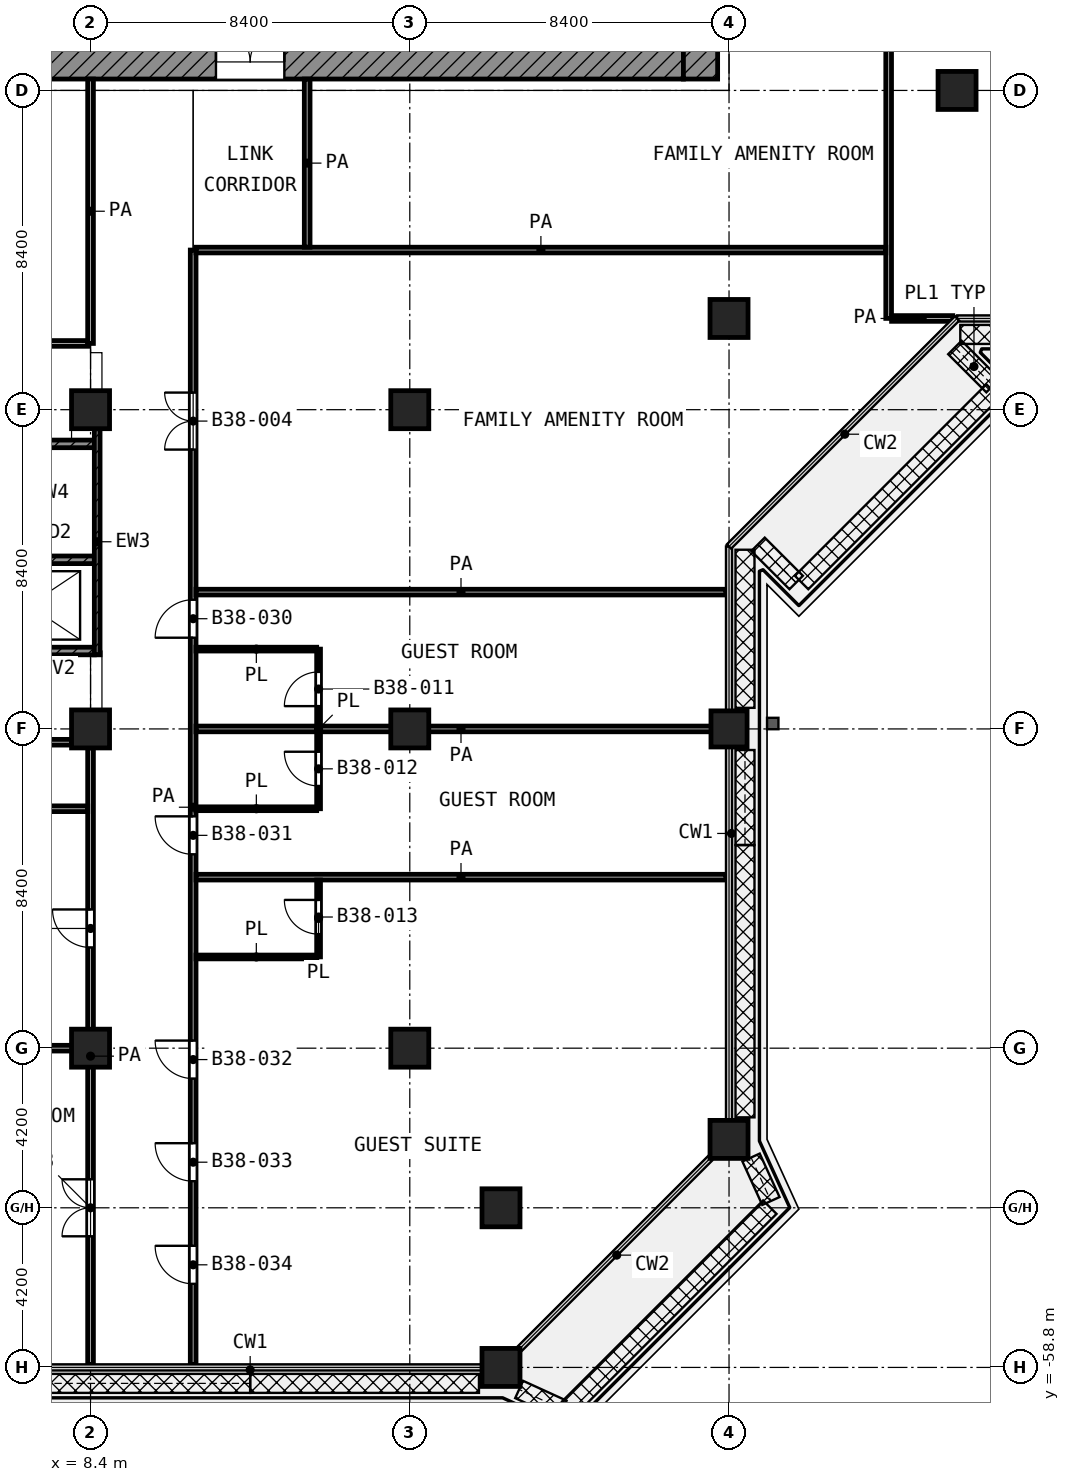
"""IFC4 building model, lengths in metres.
Left out: names, types, materials, properties, quantities, classifications, styles, units other than length and angle.
Written with IfcOpenShell. Run it as: python <this file> out.ifc"""

import sys

from ifc_helpers import new_model, si_unit, direction, frame, frame_2d, origin, origin_2d, place, context, subcontext, project, spatial, rectangle, extrude, element, fill, save


model = new_model("IFC4")
c1 = context("Model", 3, precision=1e-05, world=origin(), true_north=direction((0.0, 1.0)))
c2 = subcontext(c1, "Body", "Model", "MODEL_VIEW")
j1 = project(units=[si_unit("LENGTHUNIT", "METRE"), si_unit("PLANEANGLEUNIT", "RADIAN")], contexts=[c1])
p1 = place(None, origin())
s1 = spatial("IfcSite", under=j1, at=p1, CompositionType="ELEMENT")
p2 = place(p1, origin())
s2 = spatial("IfcBuilding", under=s1, at=p2, CompositionType="ELEMENT")
p3 = place(p2, frame((0.0, 0.0, 166.8)))
s3 = spatial("IfcBuildingStorey", under=s2, at=p3, CompositionType="ELEMENT", Elevation=166.8)
for number, where, z_axis, x_axis in (
    (1, (31.2, -25.2, 0.0), (0.0, 0.0, 1.0), (1.0, 0.0, 0.0)),
    (2, (25.2, -31.2, 0.0), (0.0, 0.0, 1.0), (1.0, 0.0, 0.0)),
    (3, (8.4, -33.6, 0.0), (0.0, 0.0, 1.0), (1.0, 0.0, 0.0)),
    (4, (16.8, -33.6, 0.0), (0.0, 0.0, 1.0), (1.0, 0.0, 0.0)),
    (5, (8.4, -42.0, 0.0), (0.0, 0.0, 1.0), (1.0, 0.0, 0.0)),
    (6, (16.8, -42.0, 0.0), (0.0, 0.0, 1.0), (1.0, 0.0, 0.0)),
):
    element("IfcColumn", number, at=place(p3, frame(where, z_axis=z_axis, x_axis=x_axis)), inside=s3, PredefinedType="COLUMN", context=c2, shape_type="SweptSolid", body=[
        extrude(rectangle(XDim=1.0, YDim=1.0, at=origin_2d()), origin(), (0.0, 0.0, 1.0), 4.2),
    ])
p4 = place(p3, frame((25.2, -42.0, 0.0), z_axis=(0.0, 0.0, 1.0), x_axis=(1.0, 0.0, 0.0)))
e7 = element("IfcColumn", 7, at=p4, inside=s3, PredefinedType="COLUMN", context=c2, shape_type="SweptSolid", body=[
    extrude(rectangle(XDim=0.95, YDim=0.95, at=origin_2d()), origin(), (0.0, 0.0, 1.0), 4.2),
])
for number, where, z_axis, x_axis in (
    (8, (8.4, -50.4, 0.0), (0.0, 0.0, 1.0), (1.0, 0.0, 0.0)),
    (9, (16.8, -50.4, 0.0), (0.0, 0.0, 1.0), (1.0, 0.0, 0.0)),
    (10, (25.2, -52.8, 0.0), (0.0, 0.0, 1.0), (1.0, 0.0, 0.0)),
    (11, (19.2, -54.6, 0.0), (0.0, 0.0, 1.0), (1.0, 0.0, 0.0)),
    (12, (19.2, -58.8, 0.0), (0.0, 0.0, 1.0), (1.0, 0.0, 0.0)),
):
    element("IfcColumn", number, at=place(p3, frame(where, z_axis=z_axis, x_axis=x_axis)), inside=s3, PredefinedType="COLUMN", context=c2, shape_type="SweptSolid", body=[
        extrude(rectangle(XDim=1.0, YDim=1.0, at=origin_2d()), origin(), (0.0, 0.0, 1.0), 4.2),
    ])
p5 = place(p3, frame((5.4, -24.45, 0.0), z_axis=(0.0, 0.0, 1.0), x_axis=(1.0, 0.0, 0.0)))
e13 = element("IfcWall", 13, at=p5, inside=s3, PredefinedType="SHEAR", context=c2, shape_type="SweptSolid", body=[
    extrude(rectangle(XDim=18.6, YDim=0.9, at=frame_2d((9.3, 0.0))), origin(), (0.0, 0.0, 1.0), 3.6),
])
p6 = place(p5, frame((6.3, 0.0, 0.0)))
e14 = element("IfcOpeningElement", 14, at=p6, cuts=e13, PredefinedType="OPENING", context=c2, shape_type="SweptSolid", body=[
    extrude(rectangle(XDim=1.8, YDim=2.1, at=frame_2d((0.9, 1.05))), frame((0.0, 0.46, 0.0), z_axis=(0.0, -1.0, 0.0), x_axis=(1.0, 0.0, 0.0)), (0.0, 0.0, 1.0), 0.92),
])
p7 = place(p3, frame((24.45, -24.9, 0.0), z_axis=(0.0, 0.0, 1.0), x_axis=(0.0, 1.0, 0.0)))
e15 = element("IfcWall", 15, at=p7, inside=s3, PredefinedType="SHEAR", context=c2, shape_type="SweptSolid", body=[
    extrude(rectangle(XDim=0.9, YDim=0.9, at=frame_2d((0.45, 0.0))), origin(), (0.0, 0.0, 1.0), 3.6),
])
p8 = place(p3, frame((8.575, -40.05, 0.0), z_axis=(0.0, 0.0, 1.0), x_axis=(0.0, 1.0, 0.0)))
e16 = element("IfcWall", 16, at=p8, inside=s3, PredefinedType="SHEAR", context=c2, shape_type="SweptSolid", body=[
    extrude(rectangle(XDim=5.95, YDim=0.15, at=frame_2d((2.975, 0.0))), origin(), (0.0, 0.0, 1.0), 3.6),
])
p9 = place(p3, frame((0.45, -34.5, 0.0), z_axis=(0.0, 0.0, 1.0), x_axis=(1.0, 0.0, 0.0)))
e17 = element("IfcWall", 17, at=p9, inside=s3, PredefinedType="SHEAR", context=c2, shape_type="SweptSolid", body=[
    extrude(rectangle(XDim=8.05, YDim=0.2, at=frame_2d((4.025, 0.0))), origin(), (0.0, 0.0, 1.0), 3.6),
])
p10 = place(p9, frame((0.75, 0.0, 0.0)))
e18 = element("IfcOpeningElement", 18, at=p10, cuts=e17, PredefinedType="OPENING", context=c2, shape_type="SweptSolid", body=[
    extrude(rectangle(XDim=1.1, YDim=2.1, at=frame_2d((0.55, 1.05))), frame((0.0, 0.11, 0.0), z_axis=(0.0, -1.0, 0.0), x_axis=(1.0, 0.0, 0.0)), (0.0, 0.0, 1.0), 0.22),
])
p11 = place(p3, frame((0.45, -37.55, 0.0), z_axis=(0.0, 0.0, 1.0), x_axis=(1.0, 0.0, 0.0)))
e19 = element("IfcWall", 19, at=p11, inside=s3, PredefinedType="SHEAR", context=c2, shape_type="SweptSolid", body=[
    extrude(rectangle(XDim=8.05, YDim=0.2, at=frame_2d((4.025, 0.0))), origin(), (0.0, 0.0, 1.0), 3.6),
])
p12 = place(p11, frame((0.1, 0.0, 0.0)))
e20 = element("IfcOpeningElement", 20, at=p12, cuts=e19, PredefinedType="OPENING", context=c2, shape_type="SweptSolid", body=[
    extrude(rectangle(XDim=1.1, YDim=2.1, at=frame_2d((0.55, 1.05))), frame((0.0, 0.11, 0.0), z_axis=(0.0, -1.0, 0.0), x_axis=(1.0, 0.0, 0.0)), (0.0, 0.0, 1.0), 0.22),
])
p13 = place(p3, frame((0.45, -39.95, 0.0), z_axis=(0.0, 0.0, 1.0), x_axis=(1.0, 0.0, 0.0)))
e21 = element("IfcWall", 21, at=p13, inside=s3, PredefinedType="SHEAR", context=c2, shape_type="SweptSolid", body=[
    extrude(rectangle(XDim=8.05, YDim=0.2, at=frame_2d((4.025, 0.0))), origin(), (0.0, 0.0, 1.0), 3.6),
])
p14 = place(p13, frame((2.0, 0.0, 0.0)))
e22 = element("IfcOpeningElement", 22, at=p14, cuts=e21, PredefinedType="OPENING", context=c2, shape_type="SweptSolid", body=[
    extrude(rectangle(XDim=1.1, YDim=2.1, at=frame_2d((0.55, 1.05))), frame((0.0, 0.11, 0.0), z_axis=(0.0, -1.0, 0.0), x_axis=(1.0, 0.0, 0.0)), (0.0, 0.0, 1.0), 0.22),
])
p15 = place(p3, frame((11.175, -48.0, 0.0), z_axis=(0.0, 0.0, 1.0), x_axis=(1.0, 0.0, 0.0)))
e23 = element("IfcWall", 23, at=p15, inside=s3, PredefinedType="PARTITIONING", context=c2, shape_type="SweptSolid", body=[
    extrude(rectangle(XDim=3.174, YDim=0.1, at=frame_2d((1.587, 0.0))), origin(), (0.0, 0.0, 1.0), 3.6),
])
for number, where, z_axis, x_axis in (
    (24, (11.175, -44.1, 0.0), (0.0, 0.0, 1.0), (1.0, 0.0, 0.0)),
    (25, (11.175, -39.9, 0.0), (0.0, 0.0, 1.0), (1.0, 0.0, 0.0)),
):
    element("IfcWall", number, at=place(p3, frame(where, z_axis=z_axis, x_axis=x_axis)), inside=s3, PredefinedType="PARTITIONING", context=c2, shape_type="SweptSolid", body=[
        extrude(rectangle(XDim=3.175, YDim=0.1, at=frame_2d((1.587, 0.0))), origin(), (0.0, 0.0, 1.0), 3.6),
    ])
p16 = place(p3, frame((14.4, -47.998, 0.0), z_axis=(0.0, 0.0, 1.0), x_axis=(0.0, 1.0, 0.0)))
e26 = element("IfcWall", 26, at=p16, inside=s3, PredefinedType="PARTITIONING", context=c2, shape_type="SweptSolid", body=[
    extrude(rectangle(XDim=2.023, YDim=0.1, at=frame_2d((1.011, 0.0))), origin(), (0.0, 0.0, 1.0), 3.6),
])
p17 = place(p16, frame((0.599, 0.0, 0.0)))
e27 = element("IfcOpeningElement", 27, at=p17, cuts=e26, PredefinedType="OPENING", context=c2, shape_type="SweptSolid", body=[
    extrude(rectangle(XDim=0.9, YDim=2.1, at=frame_2d((0.45, 1.05))), frame((0.0, 0.06, 0.0), z_axis=(0.0, -1.0, 0.0), x_axis=(1.0, 0.0, 0.0)), (0.0, 0.0, 1.0), 0.12),
])
p18 = place(p3, frame((14.4, -44.1, 0.0), z_axis=(0.0, 0.0, 1.0), x_axis=(0.0, 1.0, 0.0)))
e28 = element("IfcWall", 28, at=p18, inside=s3, PredefinedType="PARTITIONING", context=c2, shape_type="SweptSolid", body=[
    extrude(rectangle(XDim=4.2, YDim=0.1, at=frame_2d((2.1, 0.0))), origin(), (0.0, 0.0, 1.0), 3.6),
])
p19 = place(p18, frame((2.7, 0.0, 0.0)))
e29 = element("IfcOpeningElement", 29, at=p19, cuts=e28, PredefinedType="OPENING", context=c2, shape_type="SweptSolid", body=[
    extrude(rectangle(XDim=0.9, YDim=2.1, at=frame_2d((0.45, 1.05))), frame((0.0, 0.06, 0.0), z_axis=(0.0, -1.0, 0.0), x_axis=(1.0, 0.0, 0.0)), (0.0, 0.0, 1.0), 0.12),
])
p20 = place(p18, frame((0.6, 0.0, 0.0)))
e30 = element("IfcOpeningElement", 30, at=p20, cuts=e28, PredefinedType="OPENING", context=c2, shape_type="SweptSolid", body=[
    extrude(rectangle(XDim=0.9, YDim=2.1, at=frame_2d((0.45, 1.05))), frame((0.0, 0.06, 0.0), z_axis=(0.0, -1.0, 0.0), x_axis=(1.0, 0.0, 0.0)), (0.0, 0.0, 1.0), 0.12),
])
p21 = place(p3, frame((0.08, -50.4, 0.0), z_axis=(0.0, 0.0, 1.0), x_axis=(1.0, 0.0, 0.0)))
e31 = element("IfcWall", 31, at=p21, inside=s3, PredefinedType="PARTITIONING", context=c2, shape_type="SweptSolid", body=[
    extrude(rectangle(XDim=8.245, YDim=0.15, at=frame_2d((4.123, 0.0))), origin(), (0.0, 0.0, 1.0), 3.6),
])
p22 = place(p3, frame((11.175, -45.9, 0.0), z_axis=(0.0, 0.0, 1.0), x_axis=(1.0, 0.0, 0.0)))
e32 = element("IfcWall", 32, at=p22, inside=s3, PredefinedType="PARTITIONING", context=c2, shape_type="SweptSolid", body=[
    extrude(rectangle(XDim=13.945, YDim=0.15, at=frame_2d((6.973, 0.0))), origin(), (0.0, 0.0, 1.0), 3.6),
])
p23 = place(p3, frame((0.08, -44.1, 0.0), z_axis=(0.0, 0.0, 1.0), x_axis=(1.0, 0.0, 0.0)))
e33 = element("IfcWall", 33, at=p23, inside=s3, PredefinedType="PARTITIONING", context=c2, shape_type="SweptSolid", body=[
    extrude(rectangle(XDim=8.245, YDim=0.15, at=frame_2d((4.123, 0.0))), origin(), (0.0, 0.0, 1.0), 3.6),
])
p24 = place(p3, frame((2.327, -42.35, 0.0), z_axis=(0.0, 0.0, 1.0), x_axis=(1.0, 0.0, 0.0)))
e34 = element("IfcWall", 34, at=p24, inside=s3, PredefinedType="PARTITIONING", context=c2, shape_type="SweptSolid", body=[
    extrude(rectangle(XDim=5.573, YDim=0.15, at=frame_2d((2.787, 0.0))), origin(), (0.0, 0.0, 1.0), 3.6),
])
p25 = place(p24, frame((2.249, 0.0, 0.0)))
e35 = element("IfcOpeningElement", 35, at=p25, cuts=e34, PredefinedType="OPENING", context=c2, shape_type="SweptSolid", body=[
    extrude(rectangle(XDim=1.0, YDim=2.1, at=frame_2d((0.5, 1.05))), frame((0.0, 0.085, 0.0), z_axis=(0.0, -1.0, 0.0), x_axis=(1.0, 0.0, 0.0)), (0.0, 0.0, 1.0), 0.17),
])
for number, where, z_axis, x_axis in (
    (36, (11.175, -42.0, 0.0), (0.0, 0.0, 1.0), (1.0, 0.0, 0.0)),
    (37, (11.175, -38.4, 0.0), (0.0, 0.0, 1.0), (1.0, 0.0, 0.0)),
):
    element("IfcWall", number, at=place(p3, frame(where, z_axis=z_axis, x_axis=x_axis)), inside=s3, PredefinedType="PARTITIONING", context=c2, shape_type="SweptSolid", body=[
        extrude(rectangle(XDim=13.945, YDim=0.15, at=frame_2d((6.973, 0.0))), origin(), (0.0, 0.0, 1.0), 3.6),
    ])
p26 = place(p3, frame((0.08, -31.857, 0.0), z_axis=(0.0, 0.0, 1.0), x_axis=(1.0, 0.0, 0.0)))
e38 = element("IfcWall", 38, at=p26, inside=s3, PredefinedType="PARTITIONING", context=c2, shape_type="SweptSolid", body=[
    extrude(rectangle(XDim=8.245, YDim=0.15, at=frame_2d((4.123, 0.0))), origin(), (0.0, 0.0, 1.0), 3.6),
])
p27 = place(p26, frame((3.52, 0.0, 0.0)))
e39 = element("IfcOpeningElement", 39, at=p27, cuts=e38, PredefinedType="OPENING", context=c2, shape_type="SweptSolid", body=[
    extrude(rectangle(XDim=1.2, YDim=2.1, at=frame_2d((0.6, 1.05))), frame((0.0, 0.085, 0.0), z_axis=(0.0, -1.0, 0.0), x_axis=(1.0, 0.0, 0.0)), (0.0, 0.0, 1.0), 0.17),
])
p28 = place(p3, frame((29.477, -31.2, 0.0), z_axis=(0.0, 0.0, 1.0), x_axis=(1.0, 0.0, 0.0)))
e40 = element("IfcWall", 40, at=p28, inside=s3, PredefinedType="PARTITIONING", context=c2, shape_type="SweptSolid", body=[
    extrude(rectangle(XDim=1.61, YDim=0.15, at=frame_2d((0.805, 0.0))), origin(), (0.0, 0.0, 1.0), 3.6),
])
p29 = place(p3, frame((11.175, -29.4, 0.0), z_axis=(0.0, 0.0, 1.0), x_axis=(1.0, 0.0, 0.0)))
e41 = element("IfcWall", 41, at=p29, inside=s3, PredefinedType="PARTITIONING", context=c2, shape_type="SweptSolid", body=[
    extrude(rectangle(XDim=18.15, YDim=0.15, at=frame_2d((9.075, 0.0))), origin(), (0.0, 0.0, 1.0), 3.6),
])
p30 = place(p3, frame((8.4, -58.72, 0.0), z_axis=(0.0, 0.0, 1.0), x_axis=(0.0, 1.0, 0.0)))
e42 = element("IfcWall", 42, at=p30, inside=s3, PredefinedType="PARTITIONING", context=c2, shape_type="SweptSolid", body=[
    extrude(rectangle(XDim=16.22, YDim=0.15, at=frame_2d((8.11, 0.0))), origin(), (0.0, 0.0, 1.0), 3.6),
])
p31 = place(p30, frame((3.37, 0.0, 0.0)))
e43 = element("IfcOpeningElement", 43, at=p31, cuts=e42, PredefinedType="OPENING", context=c2, shape_type="SweptSolid", body=[
    extrude(rectangle(XDim=1.5, YDim=2.1, at=frame_2d((0.75, 1.05))), frame((0.0, 0.085, 0.0), z_axis=(0.0, -1.0, 0.0), x_axis=(1.0, 0.0, 0.0)), (0.0, 0.0, 1.0), 0.17),
])
p32 = place(p30, frame((10.97, 0.0, 0.0)))
e44 = element("IfcOpeningElement", 44, at=p32, cuts=e42, PredefinedType="OPENING", context=c2, shape_type="SweptSolid", body=[
    extrude(rectangle(XDim=1.0, YDim=2.1, at=frame_2d((0.5, 1.05))), frame((0.0, 0.085, 0.0), z_axis=(0.0, -1.0, 0.0), x_axis=(1.0, 0.0, 0.0)), (0.0, 0.0, 1.0), 0.17),
])
p33 = place(p3, frame((8.4, -31.857, 0.0), z_axis=(0.0, 0.0, 1.0), x_axis=(0.0, 1.0, 0.0)))
e45 = element("IfcWall", 45, at=p33, inside=s3, PredefinedType="PARTITIONING", context=c2, shape_type="SweptSolid", body=[
    extrude(rectangle(XDim=6.957, YDim=0.15, at=frame_2d((3.479, 0.0))), origin(), (0.0, 0.0, 1.0), 3.6),
])
p34 = place(p3, frame((11.1, -58.72, 0.0), z_axis=(0.0, 0.0, 1.0), x_axis=(0.0, 1.0, 0.0)))
e46 = element("IfcWall", 46, at=p34, inside=s3, PredefinedType="PARTITIONING", context=c2, shape_type="SweptSolid", body=[
    extrude(rectangle(XDim=29.32, YDim=0.15, at=frame_2d((14.66, 0.0))), origin(), (0.0, 0.0, 1.0), 3.6),
])
p35 = place(p34, frame((24.07, 0.0, 0.0)))
e47 = element("IfcOpeningElement", 47, at=p35, cuts=e46, PredefinedType="OPENING", context=c2, shape_type="SweptSolid", body=[
    extrude(rectangle(XDim=1.5, YDim=2.1, at=frame_2d((0.75, 1.05))), frame((0.0, 0.085, 0.0), z_axis=(0.0, -1.0, 0.0), x_axis=(1.0, 0.0, 0.0)), (0.0, 0.0, 1.0), 0.17),
])
p36 = place(p34, frame((19.12, 0.0, 0.0)))
e48 = element("IfcOpeningElement", 48, at=p36, cuts=e46, PredefinedType="OPENING", context=c2, shape_type="SweptSolid", body=[
    extrude(rectangle(XDim=1.0, YDim=2.1, at=frame_2d((0.5, 1.05))), frame((0.0, 0.085, 0.0), z_axis=(0.0, -1.0, 0.0), x_axis=(1.0, 0.0, 0.0)), (0.0, 0.0, 1.0), 0.17),
])
p37 = place(p34, frame((13.42, 0.0, 0.0)))
e49 = element("IfcOpeningElement", 49, at=p37, cuts=e46, PredefinedType="OPENING", context=c2, shape_type="SweptSolid", body=[
    extrude(rectangle(XDim=1.0, YDim=2.1, at=frame_2d((0.5, 1.05))), frame((0.0, 0.085, 0.0), z_axis=(0.0, -1.0, 0.0), x_axis=(1.0, 0.0, 0.0)), (0.0, 0.0, 1.0), 0.17),
])
p38 = place(p34, frame((7.52, 0.0, 0.0)))
e50 = element("IfcOpeningElement", 50, at=p38, cuts=e46, PredefinedType="OPENING", context=c2, shape_type="SweptSolid", body=[
    extrude(rectangle(XDim=1.0, YDim=2.1, at=frame_2d((0.5, 1.05))), frame((0.0, 0.085, 0.0), z_axis=(0.0, -1.0, 0.0), x_axis=(1.0, 0.0, 0.0)), (0.0, 0.0, 1.0), 0.17),
])
p39 = place(p34, frame((4.82, 0.0, 0.0)))
e51 = element("IfcOpeningElement", 51, at=p39, cuts=e46, PredefinedType="OPENING", context=c2, shape_type="SweptSolid", body=[
    extrude(rectangle(XDim=1.0, YDim=2.1, at=frame_2d((0.5, 1.05))), frame((0.0, 0.085, 0.0), z_axis=(0.0, -1.0, 0.0), x_axis=(1.0, 0.0, 0.0)), (0.0, 0.0, 1.0), 0.17),
])
p40 = place(p34, frame((2.12, 0.0, 0.0)))
e52 = element("IfcOpeningElement", 52, at=p40, cuts=e46, PredefinedType="OPENING", context=c2, shape_type="SweptSolid", body=[
    extrude(rectangle(XDim=1.0, YDim=2.1, at=frame_2d((0.5, 1.05))), frame((0.0, 0.085, 0.0), z_axis=(0.0, -1.0, 0.0), x_axis=(1.0, 0.0, 0.0)), (0.0, 0.0, 1.0), 0.17),
])
p41 = place(p3, frame((14.1, -29.325, 0.0), z_axis=(0.0, 0.0, 1.0), x_axis=(0.0, 1.0, 0.0)))
e53 = element("IfcWall", 53, at=p41, inside=s3, PredefinedType="PARTITIONING", context=c2, shape_type="SweptSolid", body=[
    extrude(rectangle(XDim=4.425, YDim=0.15, at=frame_2d((2.212, 0.0))), origin(), (0.0, 0.0, 1.0), 3.6),
])
p42 = place(p3, frame((29.4, -31.198, 0.0), z_axis=(0.0, 0.0, 1.0), x_axis=(0.0, 1.0, 0.0)))
e54 = element("IfcWall", 54, at=p42, inside=s3, PredefinedType="PARTITIONING", context=c2, shape_type="SweptSolid", body=[
    extrude(rectangle(XDim=20.098, YDim=0.15, at=frame_2d((10.049, 0.0))), origin(), (0.0, 0.0, 1.0), 3.6),
])
p43 = place(p6, origin())
e55 = element("IfcDoor", 55, at=p43, inside=s3, OperationType="DOUBLE_DOOR_SINGLE_SWING", PredefinedType="DOOR", context=c2, shape_type="SweptSolid", body=[
    extrude(rectangle(XDim=1.8, YDim=2.1, at=frame_2d((0.9, 1.05))), frame((0.0, 0.025, 0.0), z_axis=(0.0, -1.0, 0.0), x_axis=(1.0, 0.0, 0.0)), (0.0, 0.0, 1.0), 0.05),
])
fill(e14, e55)
p44 = place(p31, origin())
e56 = element("IfcDoor", 56, at=p44, inside=s3, OperationType="DOUBLE_DOOR_SINGLE_SWING", PredefinedType="DOOR", context=c2, shape_type="SweptSolid", body=[
    extrude(rectangle(XDim=1.5, YDim=2.1, at=frame_2d((0.75, 1.05))), frame((0.0, 0.025, 0.0), z_axis=(0.0, -1.0, 0.0), x_axis=(1.0, 0.0, 0.0)), (0.0, 0.0, 1.0), 0.05),
])
fill(e43, e56)
p45 = place(p35, origin())
e57 = element("IfcDoor", 57, at=p45, inside=s3, OperationType="DOUBLE_DOOR_SINGLE_SWING", PredefinedType="DOOR", context=c2, shape_type="SweptSolid", body=[
    extrude(rectangle(XDim=1.5, YDim=2.1, at=frame_2d((0.75, 1.05))), frame((0.0, 0.025, 0.0), z_axis=(0.0, -1.0, 0.0), x_axis=(1.0, 0.0, 0.0)), (0.0, 0.0, 1.0), 0.05),
])
fill(e47, e57)
p46 = place(p36, origin())
e58 = element("IfcDoor", 58, at=p46, inside=s3, OperationType="SINGLE_SWING_LEFT", PredefinedType="DOOR", context=c2, shape_type="SweptSolid", body=[
    extrude(rectangle(XDim=1.0, YDim=2.1, at=frame_2d((0.5, 1.05))), frame((0.0, 0.025, 0.0), z_axis=(0.0, -1.0, 0.0), x_axis=(1.0, 0.0, 0.0)), (0.0, 0.0, 1.0), 0.05),
])
fill(e48, e58)
p47 = place(p19, origin())
e59 = element("IfcDoor", 59, at=p47, inside=s3, OperationType="SINGLE_SWING_LEFT", PredefinedType="DOOR", context=c2, shape_type="SweptSolid", body=[
    extrude(rectangle(XDim=0.9, YDim=2.1, at=frame_2d((0.45, 1.05))), frame((0.0, 0.025, 0.0), z_axis=(0.0, -1.0, 0.0), x_axis=(1.0, 0.0, 0.0)), (0.0, 0.0, 1.0), 0.05),
])
fill(e29, e59)
p48 = place(p37, origin())
e60 = element("IfcDoor", 60, at=p48, inside=s3, OperationType="SINGLE_SWING_RIGHT", PredefinedType="DOOR", context=c2, shape_type="SweptSolid", body=[
    extrude(rectangle(XDim=1.0, YDim=2.1, at=frame_2d((0.5, 1.05))), frame((0.0, 0.025, 0.0), z_axis=(0.0, -1.0, 0.0), x_axis=(1.0, 0.0, 0.0)), (0.0, 0.0, 1.0), 0.05),
])
fill(e49, e60)
p49 = place(p20, origin())
e61 = element("IfcDoor", 61, at=p49, inside=s3, OperationType="SINGLE_SWING_RIGHT", PredefinedType="DOOR", context=c2, shape_type="SweptSolid", body=[
    extrude(rectangle(XDim=0.9, YDim=2.1, at=frame_2d((0.45, 1.05))), frame((0.0, 0.025, 0.0), z_axis=(0.0, -1.0, 0.0), x_axis=(1.0, 0.0, 0.0)), (0.0, 0.0, 1.0), 0.05),
])
fill(e30, e61)
p50 = place(p38, origin())
e62 = element("IfcDoor", 62, at=p50, inside=s3, OperationType="SINGLE_SWING_RIGHT", PredefinedType="DOOR", context=c2, shape_type="SweptSolid", body=[
    extrude(rectangle(XDim=1.0, YDim=2.1, at=frame_2d((0.5, 1.05))), frame((0.0, 0.025, 0.0), z_axis=(0.0, -1.0, 0.0), x_axis=(1.0, 0.0, 0.0)), (0.0, 0.0, 1.0), 0.05),
])
fill(e50, e62)
p51 = place(p39, origin())
e63 = element("IfcDoor", 63, at=p51, inside=s3, OperationType="SINGLE_SWING_RIGHT", PredefinedType="DOOR", context=c2, shape_type="SweptSolid", body=[
    extrude(rectangle(XDim=1.0, YDim=2.1, at=frame_2d((0.5, 1.05))), frame((0.0, 0.025, 0.0), z_axis=(0.0, -1.0, 0.0), x_axis=(1.0, 0.0, 0.0)), (0.0, 0.0, 1.0), 0.05),
])
fill(e51, e63)
p52 = place(p40, origin())
e64 = element("IfcDoor", 64, at=p52, inside=s3, OperationType="SINGLE_SWING_RIGHT", PredefinedType="DOOR", context=c2, shape_type="SweptSolid", body=[
    extrude(rectangle(XDim=1.0, YDim=2.1, at=frame_2d((0.5, 1.05))), frame((0.0, 0.025, 0.0), z_axis=(0.0, -1.0, 0.0), x_axis=(1.0, 0.0, 0.0)), (0.0, 0.0, 1.0), 0.05),
])
fill(e52, e64)
p53 = place(p17, origin())
e65 = element("IfcDoor", 65, at=p53, inside=s3, OperationType="SINGLE_SWING_RIGHT", PredefinedType="DOOR", context=c2, shape_type="SweptSolid", body=[
    extrude(rectangle(XDim=0.9, YDim=2.1, at=frame_2d((0.45, 1.05))), frame((0.0, 0.025, 0.0), z_axis=(0.0, -1.0, 0.0), x_axis=(1.0, 0.0, 0.0)), (0.0, 0.0, 1.0), 0.05),
])
fill(e27, e65)
p54 = place(p32, origin())
e66 = element("IfcDoor", 66, at=p54, inside=s3, OperationType="SINGLE_SWING_RIGHT", PredefinedType="DOOR", context=c2, shape_type="SweptSolid", body=[
    extrude(rectangle(XDim=1.0, YDim=2.1, at=frame_2d((0.5, 1.05))), frame((0.0, 0.025, 0.0), z_axis=(0.0, -1.0, 0.0), x_axis=(1.0, 0.0, 0.0)), (0.0, 0.0, 1.0), 0.05),
])
fill(e44, e66)
save(model, sys.argv[1])
